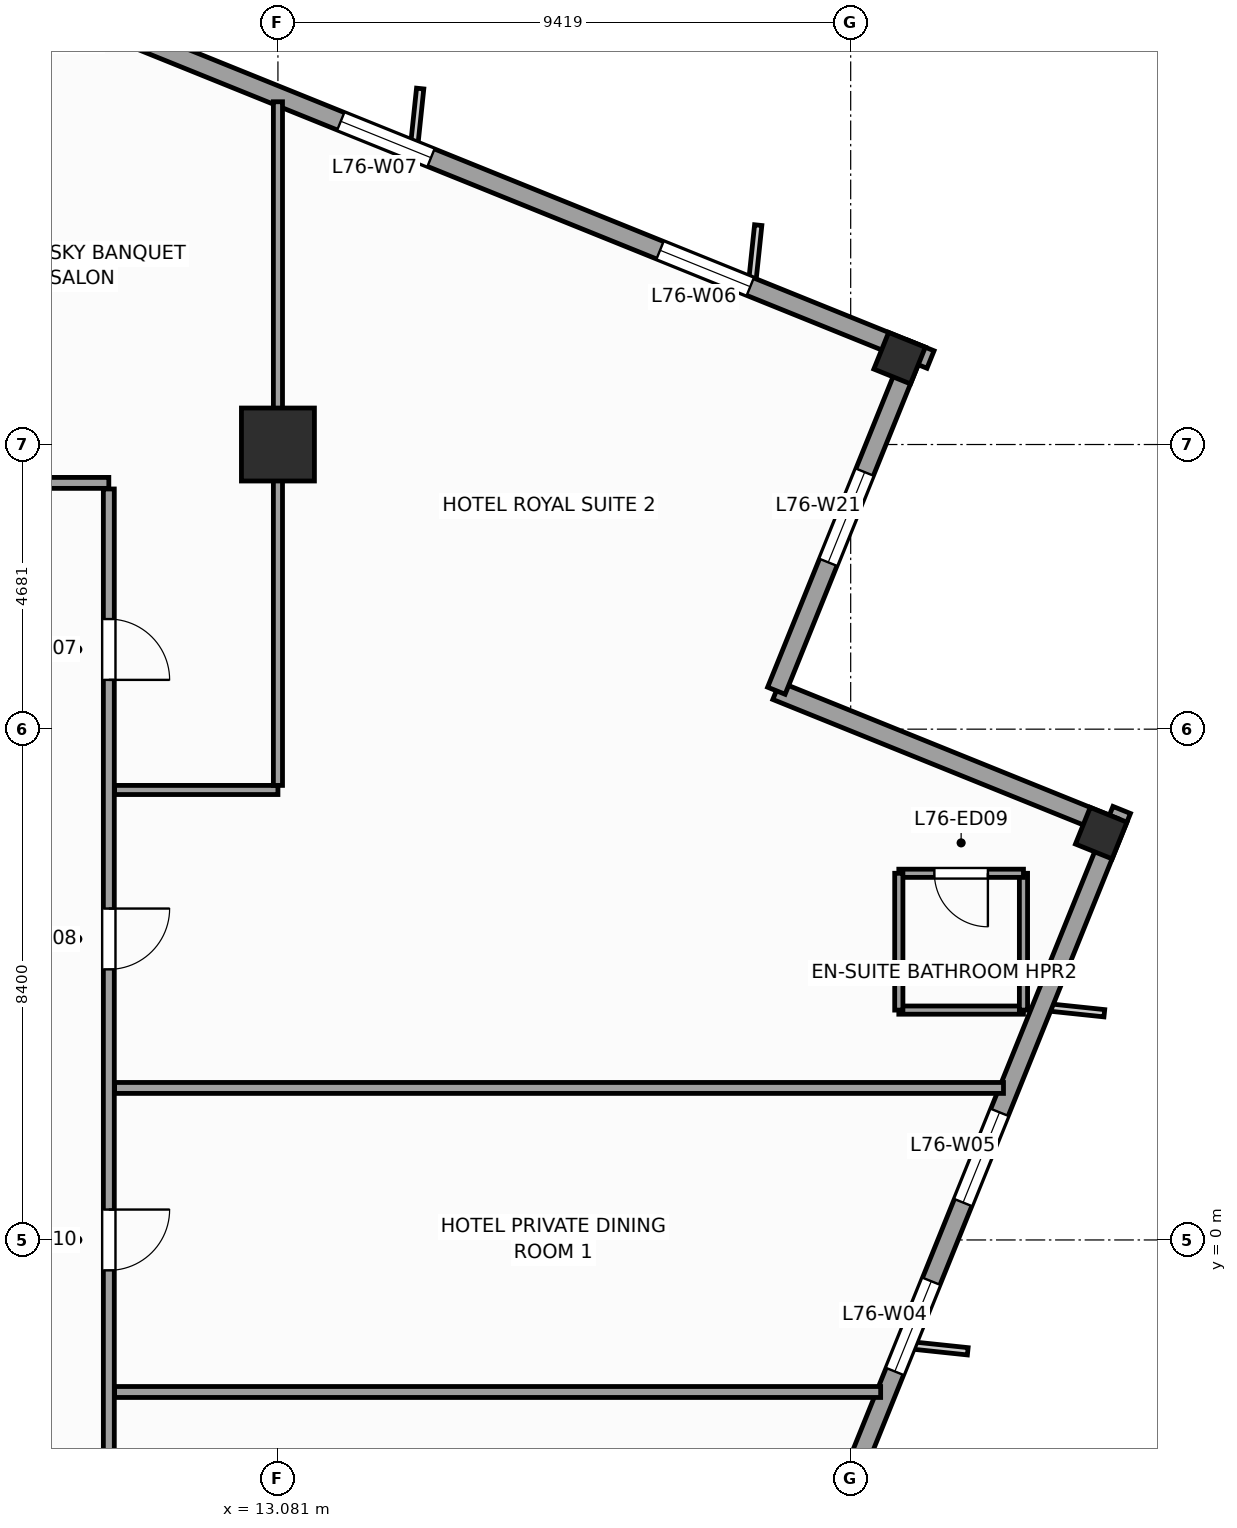
"""IFC4 building model, lengths in metres.
Left out: names, types, materials, properties, quantities, classifications, styles, units other than length and angle.
Written with IfcOpenShell. Run it as: python <this file> out.ifc"""

import sys

from ifc_helpers import new_model, si_unit, direction, frame, frame_2d, origin, origin_2d, place, context, subcontext, project, spatial, rectangle, extrude, source, transform, mapped, element, fill, save


model = new_model("IFC4")
c1 = context("Model", 3, precision=1e-05, world=origin(), true_north=direction((0.0, 1.0)))
c2 = subcontext(c1, "Body", "Model", "MODEL_VIEW")
j1 = project(units=[si_unit("LENGTHUNIT", "METRE"), si_unit("PLANEANGLEUNIT", "RADIAN")], contexts=[c1])
p1 = place(None, origin())
s1 = spatial("IfcSite", under=j1, at=p1, CompositionType="ELEMENT")
p2 = place(p1, origin())
s2 = spatial("IfcBuilding", under=s1, at=p2, CompositionType="ELEMENT")
p3 = place(p2, frame((0.0, 0.0, 308.4)))
s3 = spatial("IfcBuildingStorey", under=s2, at=p3, CompositionType="ELEMENT", Elevation=308.4)
m1 = source(origin(), c2, "Body", "SweptSolid", [
    extrude(rectangle(XDim=1.2, YDim=1.2, at=origin_2d()), origin(), (0.0, 0.0, 1.0), 3.6),
])
p4 = place(p3, frame((13.081, 13.081, 0.0), z_axis=(0.0, 0.0, 1.0), x_axis=(1.0, 0.0, 0.0)))
e1 = element("IfcColumn", 1, at=p4, inside=s3, PredefinedType="COLUMN", context=c2, shape_type="MappedRepresentation", body=[
    mapped(m1, transform((0.0, 0.0, 0.0), scale=1.0)),
])
m2 = source(origin(), c2, "Body", "SweptSolid", [
    extrude(rectangle(XDim=0.65, YDim=0.65, at=origin_2d()), origin(), (0.0, 0.0, 1.0), 3.6),
])
for number, where, z_axis, x_axis in (
    (2, (26.62, 6.69, 0.0), (0.0, 0.0, 1.0), (0.375, 0.927, 0.0)),
    (3, (23.304, 14.501, 0.0), (0.0, 0.0, 1.0), (0.375, 0.927, 0.0)),
):
    element("IfcColumn", number, at=place(p3, frame(where, z_axis=z_axis, x_axis=x_axis)), inside=s3, PredefinedType="COLUMN", context=c2, shape_type="MappedRepresentation", body=[
        mapped(m2, transform((0.0, 0.0, 0.0), scale=1.0)),
    ])
p5 = place(p3, frame((14.479, -23.813, 0.0), z_axis=(0.0, 0.0, 1.0), x_axis=(0.374609557019, 0.927182657188, 0.0)))
e4 = element("IfcWall", 4, at=p5, inside=s3, PredefinedType="STANDARD", context=c2, shape_type="SweptSolid", body=[
    extrude(rectangle(XDim=33.31, YDim=0.31, at=frame_2d((16.655, 0.0))), origin(), (0.0, 0.0, 1.0), 2.75),
])
p6 = place(p5, frame((3.197, 0.0, 0.47)))
e5 = element("IfcOpeningElement", 5, at=p6, cuts=e4, PredefinedType="OPENING", context=c2, shape_type="SweptSolid", body=[
    extrude(rectangle(XDim=1.6, YDim=2.1, at=frame_2d((0.8, 1.05))), frame((0.0, 0.165, 0.0), z_axis=(0.0, -1.0, 0.0), x_axis=(1.0, 0.0, 0.0)), (0.0, 0.0, 1.0), 0.33),
])
p7 = place(p5, frame((8.86, 0.0, 0.47)))
e6 = element("IfcOpeningElement", 6, at=p7, cuts=e4, PredefinedType="OPENING", context=c2, shape_type="SweptSolid", body=[
    extrude(rectangle(XDim=1.6, YDim=2.1, at=frame_2d((0.8, 1.05))), frame((0.0, 0.165, 0.0), z_axis=(0.0, -1.0, 0.0), x_axis=(1.0, 0.0, 0.0)), (0.0, 0.0, 1.0), 0.33),
])
p8 = place(p5, frame((14.439, 0.0, 0.47)))
e7 = element("IfcOpeningElement", 7, at=p8, cuts=e4, PredefinedType="OPENING", context=c2, shape_type="SweptSolid", body=[
    extrude(rectangle(XDim=1.6, YDim=2.1, at=frame_2d((0.8, 1.05))), frame((0.0, 0.165, 0.0), z_axis=(0.0, -1.0, 0.0), x_axis=(1.0, 0.0, 0.0)), (0.0, 0.0, 1.0), 0.33),
])
p9 = place(p5, frame((23.351, 0.0, 0.47)))
e8 = element("IfcOpeningElement", 8, at=p9, cuts=e4, PredefinedType="OPENING", context=c2, shape_type="SweptSolid", body=[
    extrude(rectangle(XDim=1.6, YDim=2.1, at=frame_2d((0.8, 1.05))), frame((0.0, 0.165, 0.0), z_axis=(0.0, -1.0, 0.0), x_axis=(1.0, 0.0, 0.0)), (0.0, 0.0, 1.0), 0.33),
])
p10 = place(p5, frame((26.347, 0.0, 0.47)))
e9 = element("IfcOpeningElement", 9, at=p10, cuts=e4, PredefinedType="OPENING", context=c2, shape_type="SweptSolid", body=[
    extrude(rectangle(XDim=1.6, YDim=2.1, at=frame_2d((0.8, 1.05))), frame((0.0, 0.165, 0.0), z_axis=(0.0, -1.0, 0.0), x_axis=(1.0, 0.0, 0.0)), (0.0, 0.0, 1.0), 0.33),
])
p11 = place(p3, frame((26.841, 6.784, 0.0), z_axis=(0.0, 0.0, 1.0), x_axis=(-0.927171722085, 0.374636620962, 0.0)))
e10 = element("IfcWall", 10, at=p11, inside=s3, PredefinedType="STANDARD", context=c2, shape_type="SweptSolid", body=[
    extrude(rectangle(XDim=6.0, YDim=0.31, at=frame_2d((3.0, 0.0))), origin(), (0.0, 0.0, 1.0), 2.65),
])
p12 = place(p3, frame((21.278, 9.032, 0.0), z_axis=(0.0, 0.0, 1.0), x_axis=(0.374602739196, 0.927185411764, 0.0)))
e11 = element("IfcWall", 11, at=p12, inside=s3, PredefinedType="STANDARD", context=c2, shape_type="SweptSolid", body=[
    extrude(rectangle(XDim=6.155, YDim=0.31, at=frame_2d((3.078, 0.0))), origin(), (0.0, 0.0, 1.0), 3.35),
])
p13 = place(p12, frame((2.278, 0.0, 0.47)))
e12 = element("IfcOpeningElement", 12, at=p13, cuts=e11, PredefinedType="OPENING", context=c2, shape_type="SweptSolid", body=[
    extrude(rectangle(XDim=1.6, YDim=2.1, at=frame_2d((0.8, 1.05))), frame((0.0, 0.165, 0.0), z_axis=(0.0, -1.0, 0.0), x_axis=(1.0, 0.0, 0.0)), (0.0, 0.0, 1.0), 0.33),
])
p14 = place(p3, frame((23.813, 14.479, 0.0), z_axis=(0.0, 0.0, 1.0), x_axis=(-0.927182657188, 0.374609557019, 0.0)))
e13 = element("IfcWall", 13, at=p14, inside=s3, PredefinedType="STANDARD", context=c2, shape_type="SweptSolid", body=[
    extrude(rectangle(XDim=33.31, YDim=0.31, at=frame_2d((16.655, 0.0))), origin(), (0.0, 0.0, 1.0), 2.75),
])
p15 = place(p14, frame((22.58, 0.0, 0.0)))
e14 = element("IfcOpeningElement", 14, at=p15, cuts=e13, PredefinedType="OPENING", context=c2, shape_type="SweptSolid", body=[
    extrude(rectangle(XDim=1.05, YDim=2.25, at=frame_2d((0.525, 1.125))), frame((0.0, 0.165, 0.0), z_axis=(0.0, -1.0, 0.0), x_axis=(1.0, 0.0, 0.0)), (0.0, 0.0, 1.0), 0.33),
])
p16 = place(p14, frame((3.197, 0.0, 0.47)))
e15 = element("IfcOpeningElement", 15, at=p16, cuts=e13, PredefinedType="OPENING", context=c2, shape_type="SweptSolid", body=[
    extrude(rectangle(XDim=1.6, YDim=2.1, at=frame_2d((0.8, 1.05))), frame((0.0, 0.165, 0.0), z_axis=(0.0, -1.0, 0.0), x_axis=(1.0, 0.0, 0.0)), (0.0, 0.0, 1.0), 0.33),
])
p17 = place(p14, frame((8.86, 0.0, 0.47)))
e16 = element("IfcOpeningElement", 16, at=p17, cuts=e13, PredefinedType="OPENING", context=c2, shape_type="SweptSolid", body=[
    extrude(rectangle(XDim=1.6, YDim=2.1, at=frame_2d((0.8, 1.05))), frame((0.0, 0.165, 0.0), z_axis=(0.0, -1.0, 0.0), x_axis=(1.0, 0.0, 0.0)), (0.0, 0.0, 1.0), 0.33),
])
p18 = place(p14, frame((14.439, 0.0, 0.47)))
e17 = element("IfcOpeningElement", 17, at=p18, cuts=e13, PredefinedType="OPENING", context=c2, shape_type="SweptSolid", body=[
    extrude(rectangle(XDim=1.6, YDim=2.1, at=frame_2d((0.8, 1.05))), frame((0.0, 0.165, 0.0), z_axis=(0.0, -1.0, 0.0), x_axis=(1.0, 0.0, 0.0)), (0.0, 0.0, 1.0), 0.33),
])
p19 = place(p14, frame((19.601, 0.0, 0.47)))
e18 = element("IfcOpeningElement", 18, at=p19, cuts=e13, PredefinedType="OPENING", context=c2, shape_type="SweptSolid", body=[
    extrude(rectangle(XDim=1.6, YDim=2.1, at=frame_2d((0.8, 1.05))), frame((0.0, 0.165, 0.0), z_axis=(0.0, -1.0, 0.0), x_axis=(1.0, 0.0, 0.0)), (0.0, 0.0, 1.0), 0.33),
])
p20 = place(p14, frame((29.347, 0.0, 0.47)))
e19 = element("IfcOpeningElement", 19, at=p20, cuts=e13, PredefinedType="OPENING", context=c2, shape_type="SweptSolid", body=[
    extrude(rectangle(XDim=1.6, YDim=2.1, at=frame_2d((0.8, 1.05))), frame((0.0, 0.165, 0.0), z_axis=(0.0, -1.0, 0.0), x_axis=(1.0, 0.0, 0.0)), (0.0, 0.0, 1.0), 0.33),
])
p21 = place(p3, frame((-10.3, 12.45, 0.0), z_axis=(0.0, 0.0, 1.0), x_axis=(1.0, 0.0, 0.0)))
e20 = element("IfcWall", 20, at=p21, inside=s3, PredefinedType="PARTITIONING", context=c2, shape_type="SweptSolid", body=[
    extrude(rectangle(XDim=20.6, YDim=0.18, at=frame_2d((10.3, 0.0))), origin(), (0.0, 0.0, 1.0), 3.35),
])
p22 = place(p21, frame((15.036, 0.0, 0.0)))
e21 = element("IfcOpeningElement", 21, at=p22, cuts=e20, PredefinedType="OPENING", context=c2, shape_type="SweptSolid", body=[
    extrude(rectangle(XDim=0.95, YDim=2.1, at=frame_2d((0.475, 1.05))), frame((0.0, 0.1, 0.0), z_axis=(0.0, -1.0, 0.0), x_axis=(1.0, 0.0, 0.0)), (0.0, 0.0, 1.0), 0.2),
])
p23 = place(p21, frame((3.314, 0.0, 0.0)))
e22 = element("IfcOpeningElement", 22, at=p23, cuts=e20, PredefinedType="OPENING", context=c2, shape_type="SweptSolid", body=[
    extrude(rectangle(XDim=1.0, YDim=2.15, at=frame_2d((0.5, 1.075))), frame((0.0, 0.1, 0.0), z_axis=(0.0, -1.0, 0.0), x_axis=(1.0, 0.0, 0.0)), (0.0, 0.0, 1.0), 0.2),
])
p24 = place(p21, frame((10.05, 0.0, 0.0)))
e23 = element("IfcOpeningElement", 23, at=p24, cuts=e20, PredefinedType="OPENING", context=c2, shape_type="SweptSolid", body=[
    extrude(rectangle(XDim=1.0, YDim=2.15, at=frame_2d((0.5, 1.075))), frame((0.0, 0.1, 0.0), z_axis=(0.0, -1.0, 0.0), x_axis=(1.0, 0.0, 0.0)), (0.0, 0.0, 1.0), 0.2),
])
p25 = place(p3, frame((10.3, -12.35, 0.0), z_axis=(0.0, 0.0, 1.0), x_axis=(0.0, 1.0, 0.0)))
e24 = element("IfcWall", 24, at=p25, inside=s3, PredefinedType="PARTITIONING", context=c2, shape_type="SweptSolid", body=[
    extrude(rectangle(XDim=24.7, YDim=0.18, at=frame_2d((12.35, 0.0))), origin(), (0.0, 0.0, 1.0), 3.35),
])
p26 = place(p25, frame((21.561, 0.0, 0.0)))
e25 = element("IfcOpeningElement", 25, at=p26, cuts=e24, PredefinedType="OPENING", context=c2, shape_type="SweptSolid", body=[
    extrude(rectangle(XDim=1.0, YDim=2.15, at=frame_2d((0.5, 1.075))), frame((0.0, 0.1, 0.0), z_axis=(0.0, -1.0, 0.0), x_axis=(1.0, 0.0, 0.0)), (0.0, 0.0, 1.0), 0.2),
])
p27 = place(p25, frame((16.8, 0.0, 0.0)))
e26 = element("IfcOpeningElement", 26, at=p27, cuts=e24, PredefinedType="OPENING", context=c2, shape_type="SweptSolid", body=[
    extrude(rectangle(XDim=1.0, YDim=2.15, at=frame_2d((0.5, 1.075))), frame((0.0, 0.1, 0.0), z_axis=(0.0, -1.0, 0.0), x_axis=(1.0, 0.0, 0.0)), (0.0, 0.0, 1.0), 0.2),
])
p28 = place(p25, frame((11.85, 0.0, 0.0)))
e27 = element("IfcOpeningElement", 27, at=p28, cuts=e24, PredefinedType="OPENING", context=c2, shape_type="SweptSolid", body=[
    extrude(rectangle(XDim=1.0, YDim=2.15, at=frame_2d((0.5, 1.075))), frame((0.0, 0.1, 0.0), z_axis=(0.0, -1.0, 0.0), x_axis=(1.0, 0.0, 0.0)), (0.0, 0.0, 1.0), 0.2),
])
p29 = place(p25, frame((6.9, 0.0, 0.0)))
e28 = element("IfcOpeningElement", 28, at=p29, cuts=e24, PredefinedType="OPENING", context=c2, shape_type="SweptSolid", body=[
    extrude(rectangle(XDim=1.0, YDim=2.15, at=frame_2d((0.5, 1.075))), frame((0.0, 0.1, 0.0), z_axis=(0.0, -1.0, 0.0), x_axis=(1.0, 0.0, 0.0)), (0.0, 0.0, 1.0), 0.2),
])
p30 = place(p3, frame((10.395, 2.5, 0.0), z_axis=(0.0, 0.0, 1.0), x_axis=(1.0, 0.0, 0.0)))
e29 = element("IfcWall", 29, at=p30, inside=s3, PredefinedType="PARTITIONING", context=c2, shape_type="SweptSolid", body=[
    extrude(rectangle(XDim=14.618, YDim=0.18, at=frame_2d((7.309, 0.0))), origin(), (0.0, 0.0, 1.0), 3.35),
])
p31 = place(p3, frame((10.395, -2.5, 0.0), z_axis=(0.0, 0.0, 1.0), x_axis=(1.0, 0.0, 0.0)))
e30 = element("IfcWall", 30, at=p31, inside=s3, PredefinedType="PARTITIONING", context=c2, shape_type="SweptSolid", body=[
    extrude(rectangle(XDim=12.598, YDim=0.18, at=frame_2d((6.299, 0.0))), origin(), (0.0, 0.0, 1.0), 3.35),
])
p32 = place(p3, frame((10.395, 7.4, 0.0), z_axis=(0.0, 0.0, 1.0), x_axis=(1.0, 0.0, 0.0)))
e31 = element("IfcWall", 31, at=p32, inside=s3, PredefinedType="PARTITIONING", context=c2, shape_type="SweptSolid", body=[
    extrude(rectangle(XDim=2.686, YDim=0.15, at=frame_2d((1.343, 0.0))), origin(), (0.0, 0.0, 1.0), 3.35),
])
p33 = place(p3, frame((13.081, 7.475, 0.0), z_axis=(0.0, 0.0, 1.0), x_axis=(0.0, 1.0, 0.0)))
e32 = element("IfcWall", 32, at=p33, inside=s3, PredefinedType="PARTITIONING", context=c2, shape_type="SweptSolid", body=[
    extrude(rectangle(XDim=11.243, YDim=0.15, at=frame_2d((5.621, 0.0))), origin(), (0.0, 0.0, 1.0), 2.45),
])
p34 = place(p3, frame((23.292, 3.78, 0.0), z_axis=(0.0, 0.0, 1.0), x_axis=(1.0, 0.0, 0.0)))
e33 = element("IfcWall", 33, at=p34, inside=s3, PredefinedType="PARTITIONING", context=c2, shape_type="SweptSolid", body=[
    extrude(rectangle(XDim=2.05, YDim=0.135, at=frame_2d((1.025, 0.0))), origin(), (0.0, 0.0, 1.0), 3.35),
])
p35 = place(p3, frame((25.342, 3.78, 0.0), z_axis=(0.0, 0.0, 1.0), x_axis=(0.0, 1.0, 0.0)))
e34 = element("IfcWall", 34, at=p35, inside=s3, PredefinedType="PARTITIONING", context=c2, shape_type="SweptSolid", body=[
    extrude(rectangle(XDim=2.25, YDim=0.135, at=frame_2d((1.125, 0.0))), origin(), (0.0, 0.0, 1.0), 2.75),
])
p36 = place(p3, frame((23.292, 6.03, 0.0), z_axis=(0.0, 0.0, 1.0), x_axis=(1.0, 0.0, 0.0)))
e35 = element("IfcWall", 35, at=p36, inside=s3, PredefinedType="PARTITIONING", context=c2, shape_type="SweptSolid", body=[
    extrude(rectangle(XDim=2.05, YDim=0.135, at=frame_2d((1.025, 0.0))), origin(), (0.0, 0.0, 1.0), 3.35),
])
p37 = place(p36, frame((0.585, 0.0, 0.0)))
e36 = element("IfcOpeningElement", 36, at=p37, cuts=e35, PredefinedType="OPENING", context=c2, shape_type="SweptSolid", body=[
    extrude(rectangle(XDim=0.88, YDim=2.1, at=frame_2d((0.44, 1.05))), frame((0.0, 0.078, 0.0), z_axis=(0.0, -1.0, 0.0), x_axis=(1.0, 0.0, 0.0)), (0.0, 0.0, 1.0), 0.155),
])
p38 = place(p3, frame((23.292, 3.78, 0.0), z_axis=(0.0, 0.0, 1.0), x_axis=(0.0, 1.0, 0.0)))
e37 = element("IfcWall", 37, at=p38, inside=s3, PredefinedType="PARTITIONING", context=c2, shape_type="SweptSolid", body=[
    extrude(rectangle(XDim=2.25, YDim=0.135, at=frame_2d((1.125, 0.0))), origin(), (0.0, 0.0, 1.0), 2.95),
])
m3 = source(origin(), c2, "Body", "SweptSolid", [
    extrude(rectangle(XDim=1.6, YDim=2.1, at=frame_2d((0.8, 1.05))), frame((0.0, 0.03, 0.0), z_axis=(0.0, -1.0, 0.0), x_axis=(1.0, 0.0, 0.0)), (0.0, 0.0, 1.0), 0.06),
])
p39 = place(p9, origin())
e38 = element("IfcWindow", 38, at=p39, inside=s3, PartitioningType="SINGLE_PANEL", PredefinedType="WINDOW", context=c2, shape_type="MappedRepresentation", body=[
    mapped(m3, transform((0.0, 0.0, 0.0), scale=1.0)),
])
fill(e8, e38)
p40 = place(p10, origin())
e39 = element("IfcWindow", 39, at=p40, inside=s3, PartitioningType="SINGLE_PANEL", PredefinedType="WINDOW", context=c2, shape_type="MappedRepresentation", body=[
    mapped(m3, transform((0.0, 0.0, 0.0), scale=1.0)),
])
fill(e9, e39)
p41 = place(p16, origin())
e40 = element("IfcWindow", 40, at=p41, inside=s3, PartitioningType="SINGLE_PANEL", PredefinedType="WINDOW", context=c2, shape_type="MappedRepresentation", body=[
    mapped(m3, transform((0.0, 0.0, 0.0), scale=1.0)),
])
fill(e15, e40)
p42 = place(p17, origin())
e41 = element("IfcWindow", 41, at=p42, inside=s3, PartitioningType="SINGLE_PANEL", PredefinedType="WINDOW", context=c2, shape_type="MappedRepresentation", body=[
    mapped(m3, transform((0.0, 0.0, 0.0), scale=1.0)),
])
fill(e16, e41)
p43 = place(p13, origin())
e42 = element("IfcWindow", 42, at=p43, inside=s3, PartitioningType="SINGLE_PANEL", PredefinedType="WINDOW", context=c2, shape_type="MappedRepresentation", body=[
    mapped(m3, transform((0.0, 0.0, 0.0), scale=1.0)),
])
fill(e12, e42)
m4 = source(origin(), c2, "Body", "SweptSolid", [
    extrude(rectangle(XDim=1.0, YDim=2.15, at=frame_2d((0.5, 1.075))), frame((0.0, 0.025, 0.0), z_axis=(0.0, -1.0, 0.0), x_axis=(1.0, 0.0, 0.0)), (0.0, 0.0, 1.0), 0.05),
])
p44 = place(p26, frame((1.0, 0.0, 0.0), z_axis=(0.0, 0.0, 1.0), x_axis=(-1.0, 0.0, 0.0)))
e43 = element("IfcDoor", 43, at=p44, inside=s3, OperationType="SINGLE_SWING_LEFT", PredefinedType="DOOR", context=c2, shape_type="MappedRepresentation", body=[
    mapped(m4, transform((0.0, 0.0, 0.0), scale=1.0)),
])
fill(e25, e43)
p45 = place(p27, frame((1.0, 0.0, 0.0), z_axis=(0.0, 0.0, 1.0), x_axis=(-1.0, 0.0, 0.0)))
e44 = element("IfcDoor", 44, at=p45, inside=s3, OperationType="SINGLE_SWING_RIGHT", PredefinedType="DOOR", context=c2, shape_type="MappedRepresentation", body=[
    mapped(m4, transform((0.0, 0.0, 0.0), scale=1.0)),
])
fill(e26, e44)
m5 = source(origin(), c2, "Body", "SweptSolid", [
    extrude(rectangle(XDim=0.88, YDim=2.1, at=frame_2d((0.44, 1.05))), frame((0.0, 0.025, 0.0), z_axis=(0.0, -1.0, 0.0), x_axis=(1.0, 0.0, 0.0)), (0.0, 0.0, 1.0), 0.05),
])
p46 = place(p37, frame((0.88, 0.0, 0.0), z_axis=(0.0, 0.0, 1.0), x_axis=(-1.0, 0.0, 0.0)))
e45 = element("IfcDoor", 45, at=p46, inside=s3, OperationType="SINGLE_SWING_RIGHT", PredefinedType="DOOR", context=c2, shape_type="MappedRepresentation", body=[
    mapped(m5, transform((0.0, 0.0, 0.0), scale=1.0)),
])
fill(e36, e45)
p47 = place(p28, frame((1.0, 0.0, 0.0), z_axis=(0.0, 0.0, 1.0), x_axis=(-1.0, 0.0, 0.0)))
e46 = element("IfcDoor", 46, at=p47, inside=s3, OperationType="SINGLE_SWING_RIGHT", PredefinedType="DOOR", context=c2, shape_type="MappedRepresentation", body=[
    mapped(m4, transform((0.0, 0.0, 0.0), scale=1.0)),
])
fill(e27, e46)
save(model, sys.argv[1])
